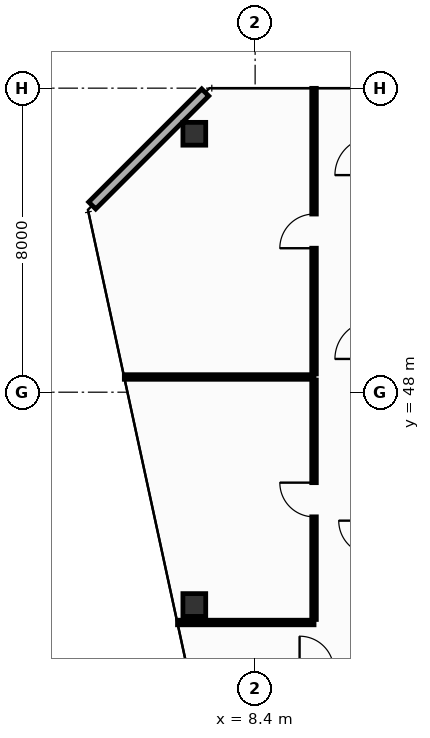
"""IFC4 building model, lengths in metres.
Left out: names, types, materials, properties, quantities, classifications, styles, units other than length and angle.
Written with IfcOpenShell. Run it as: python <this file> out.ifc"""

import sys

from ifc_helpers import new_model, si_unit, direction, frame, frame_2d, origin, origin_2d, place, context, subcontext, project, spatial, rectangle, hollow_rectangle, extrude, element, fill, save


model = new_model("IFC4")
c1 = context("Model", 3, precision=1e-05, world=origin(), true_north=direction((0.0, 1.0)))
c2 = subcontext(c1, "Body", "Model", "MODEL_VIEW")
j1 = project(units=[si_unit("LENGTHUNIT", "METRE"), si_unit("PLANEANGLEUNIT", "RADIAN")], contexts=[c1])
p1 = place(None, origin())
s1 = spatial("IfcSite", under=j1, at=p1, CompositionType="ELEMENT")
p2 = place(p1, origin())
s2 = spatial("IfcBuilding", under=s1, at=p2, CompositionType="ELEMENT")
p3 = place(p2, frame((0.0, 0.0, 323.4)))
s3 = spatial("IfcBuildingStorey", under=s2, at=p3, CompositionType="ELEMENT", Elevation=323.4)
for number, where, z_axis, x_axis in (
    (1, (6.8, 54.8, 0.0), (0.0, 0.0, 1.0), (1.0, 0.0, 0.0)),
    (2, (6.8, 42.4, 0.0), (0.0, 0.0, 1.0), (1.0, 0.0, 0.0)),
):
    element("IfcColumn", number, at=place(p3, frame(where, z_axis=z_axis, x_axis=x_axis)), inside=s3, PredefinedType="COLUMN", context=c2, shape_type="SweptSolid", body=[
        extrude(hollow_rectangle(XDim=0.6, YDim=0.6, WallThickness=0.028, at=origin_2d()), origin(), (0.0, 0.0, 1.0), 4.2),
    ])
p4 = place(p3, frame((7.087, 55.887, 0.0), z_axis=(0.0, 0.0, 1.0), x_axis=(-0.707106781187, -0.707106781187, 0.0)))
e3 = element("IfcWall", 3, at=p4, inside=s3, PredefinedType="STANDARD", context=c2, shape_type="SweptSolid", body=[
    extrude(rectangle(XDim=4.206, YDim=0.26, at=frame_2d((2.103, 0.0))), origin(), (0.0, 0.0, 1.0), 3.9),
])
p5 = place(p3, frame((6.358, 41.94, 0.0), z_axis=(0.0, 0.0, 1.0), x_axis=(1.0, 0.0, 0.0)))
e4 = element("IfcWall", 4, at=p5, inside=s3, PredefinedType="PARTITIONING", context=c2, shape_type="SweptSolid", body=[
    extrude(rectangle(XDim=3.592, YDim=0.12, at=frame_2d((1.796, 0.0))), origin(), (0.0, 0.0, 1.0), 3.435),
])
p6 = place(p3, frame((4.958, 48.4, 0.0), z_axis=(0.0, 0.0, 1.0), x_axis=(1.0, 0.0, 0.0)))
e5 = element("IfcWall", 5, at=p6, inside=s3, PredefinedType="PARTITIONING", context=c2, shape_type="SweptSolid", body=[
    extrude(rectangle(XDim=4.991, YDim=0.12, at=frame_2d((2.496, 0.0))), origin(), (0.0, 0.0, 1.0), 3.297),
])
p7 = place(p3, frame((9.95, 42.02, 0.0), z_axis=(0.0, 0.0, 1.0), x_axis=(0.0, 1.0, 0.0)))
e6 = element("IfcWall", 6, at=p7, inside=s3, PredefinedType="PARTITIONING", context=c2, shape_type="SweptSolid", body=[
    extrude(rectangle(XDim=6.3, YDim=0.12, at=frame_2d((3.15, 0.0))), origin(), (0.0, 0.0, 1.0), 3.297),
])
p8 = place(p7, frame((2.7, 0.0, 0.0)))
e7 = element("IfcOpeningElement", 7, at=p8, cuts=e6, PredefinedType="OPENING", context=c2, shape_type="SweptSolid", body=[
    extrude(rectangle(XDim=0.9, YDim=2.1, at=frame_2d((0.45, 1.05))), frame((0.0, 0.07, 0.0), z_axis=(0.0, -1.0, 0.0), x_axis=(1.0, 0.0, 0.0)), (0.0, 0.0, 1.0), 0.14),
])
p9 = place(p3, frame((9.95, 48.48, 0.0), z_axis=(0.0, 0.0, 1.0), x_axis=(0.0, 1.0, 0.0)))
e8 = element("IfcWall", 8, at=p9, inside=s3, PredefinedType="PARTITIONING", context=c2, shape_type="SweptSolid", body=[
    extrude(rectangle(XDim=7.515, YDim=0.12, at=frame_2d((3.758, 0.0))), origin(), (0.0, 0.0, 1.0), 3.285),
])
p10 = place(p9, frame((3.308, 0.0, 0.0)))
e9 = element("IfcOpeningElement", 9, at=p10, cuts=e8, PredefinedType="OPENING", context=c2, shape_type="SweptSolid", body=[
    extrude(rectangle(XDim=0.9, YDim=2.1, at=frame_2d((0.45, 1.05))), frame((0.0, 0.07, 0.0), z_axis=(0.0, -1.0, 0.0), x_axis=(1.0, 0.0, 0.0)), (0.0, 0.0, 1.0), 0.14),
])
p11 = place(p8, origin())
e10 = element("IfcDoor", 10, at=p11, inside=s3, OperationType="SINGLE_SWING_RIGHT", PredefinedType="DOOR", context=c2, shape_type="SweptSolid", body=[
    extrude(rectangle(XDim=0.9, YDim=2.1, at=frame_2d((0.45, 1.05))), frame((0.0, 0.025, 0.0), z_axis=(0.0, -1.0, 0.0), x_axis=(1.0, 0.0, 0.0)), (0.0, 0.0, 1.0), 0.05),
])
fill(e7, e10)
p12 = place(p10, origin())
e11 = element("IfcDoor", 11, at=p12, inside=s3, OperationType="SINGLE_SWING_LEFT", PredefinedType="DOOR", context=c2, shape_type="SweptSolid", body=[
    extrude(rectangle(XDim=0.9, YDim=2.1, at=frame_2d((0.45, 1.05))), frame((0.0, 0.025, 0.0), z_axis=(0.0, -1.0, 0.0), x_axis=(1.0, 0.0, 0.0)), (0.0, 0.0, 1.0), 0.05),
])
fill(e9, e11)
save(model, sys.argv[1])
